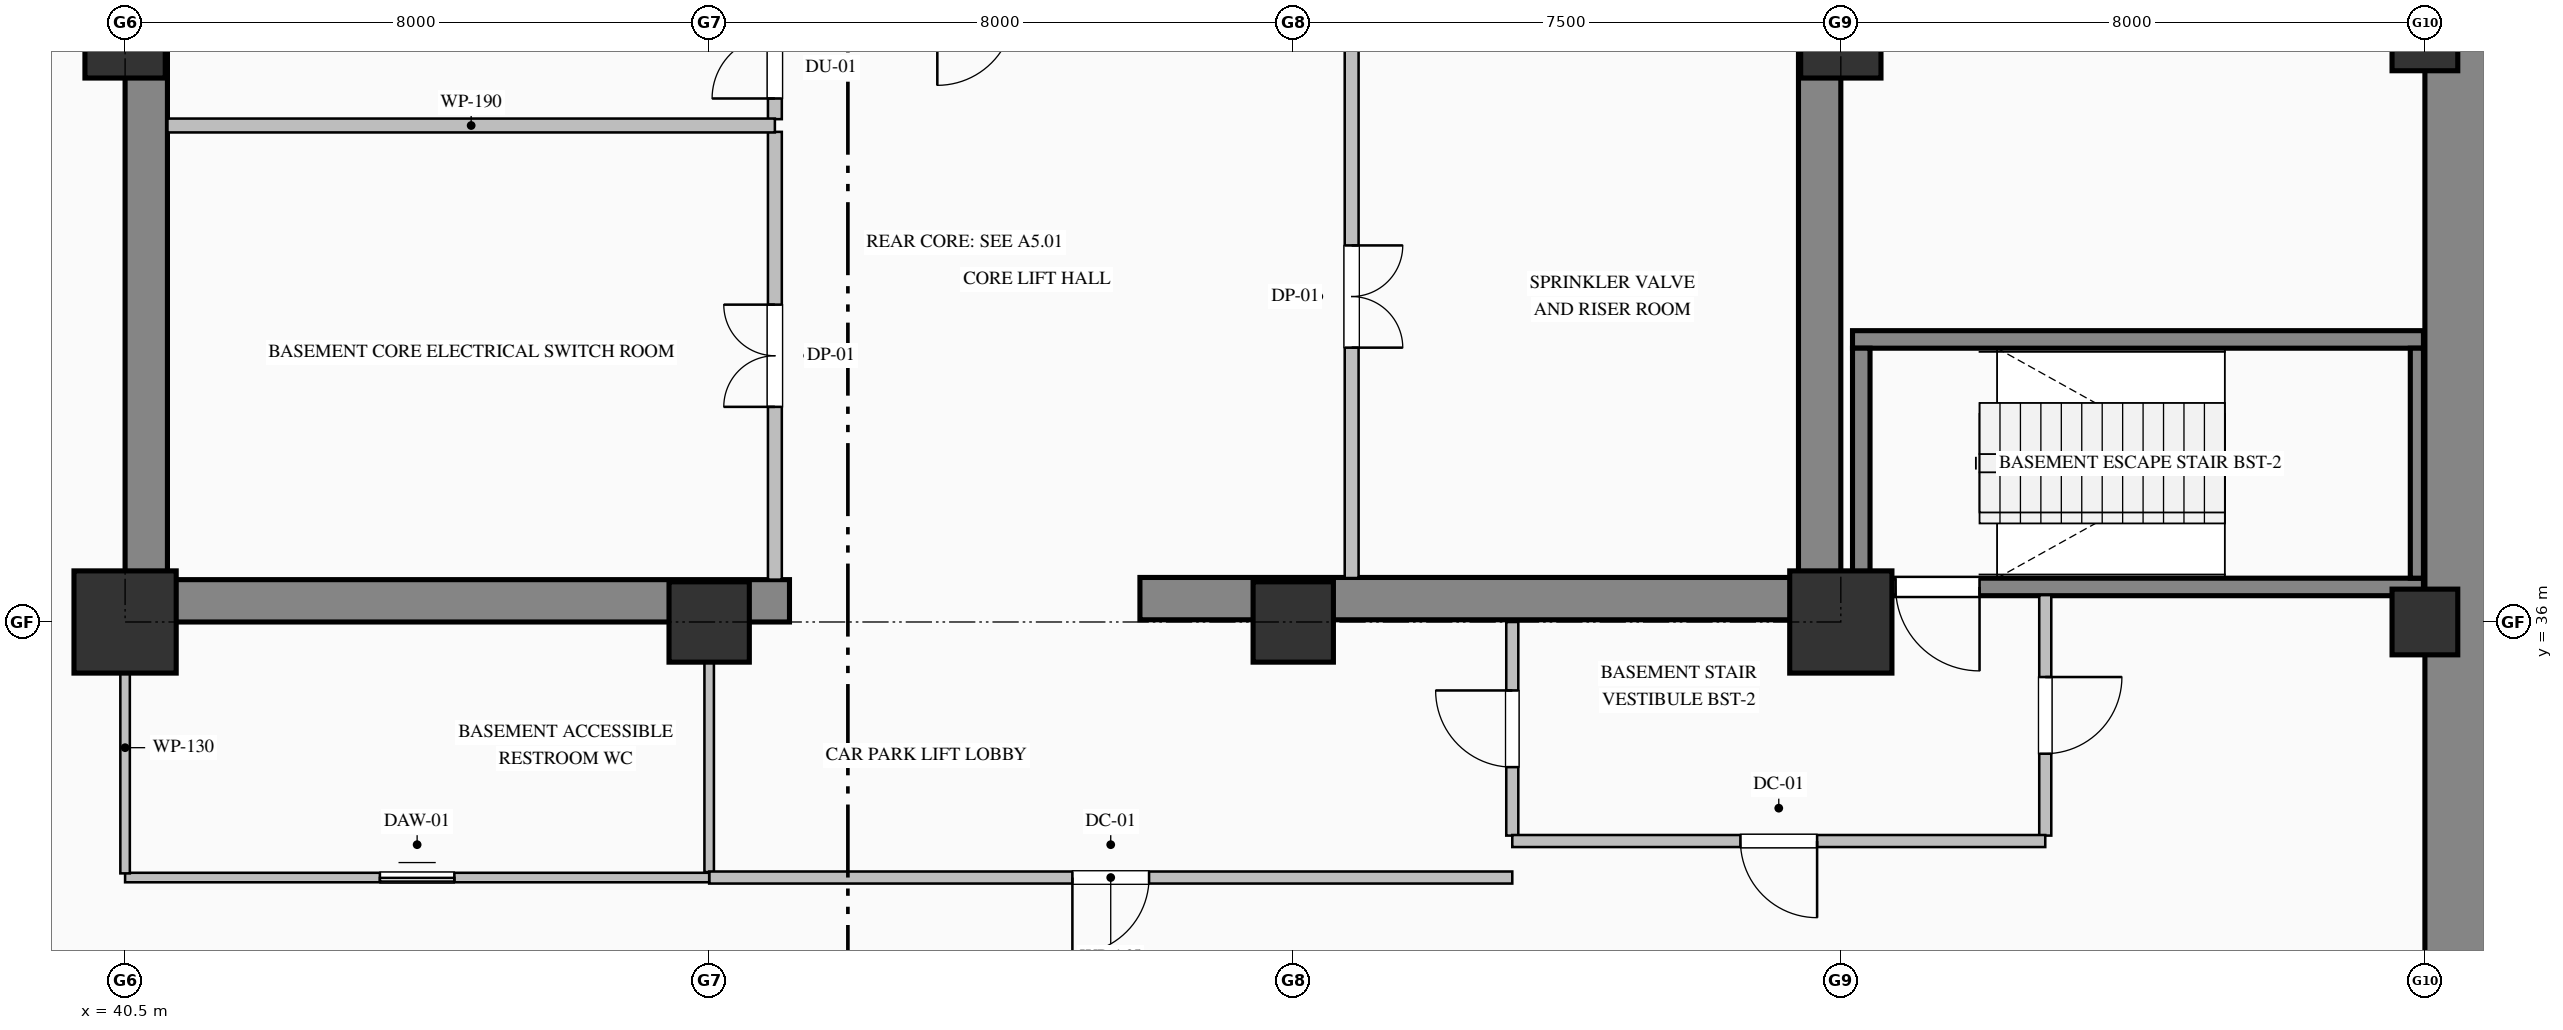
"""IFC4 building model, lengths in metres.
Left out: names, types, materials, properties, quantities, classifications, styles, units other than length and angle.
Written with IfcOpenShell. Run it as: python <this file> out.ifc"""

import sys

from ifc_helpers import new_model, si_unit, direction, frame, frame_2d, origin, origin_2d, place, context, subcontext, project, spatial, rectangle, hollow_rectangle, extrude, element, fill, save


model = new_model("IFC4")
c1 = context("Model", 3, precision=1e-05, world=origin(), true_north=direction((0.0, 1.0)))
c2 = subcontext(c1, "Body", "Model", "MODEL_VIEW")
j1 = project(units=[si_unit("LENGTHUNIT", "METRE"), si_unit("PLANEANGLEUNIT", "RADIAN")], contexts=[c1])
p1 = place(None, origin())
s1 = spatial("IfcSite", under=j1, at=p1, CompositionType="ELEMENT")
p2 = place(p1, origin())
s2 = spatial("IfcBuilding", under=s1, at=p2, CompositionType="ELEMENT")
p3 = place(p2, frame((0.0, 0.0, -9.2)))
s3 = spatial("IfcBuildingStorey", under=s2, at=p3, CompositionType="ELEMENT", Elevation=-9.2)
p4 = place(p3, frame((72.6, 0.0, 0.0), z_axis=(0.0, 0.0, 1.0), x_axis=(0.0, 1.0, 0.0)))
e1 = element("IfcWall", 1, at=p4, inside=s3, PredefinedType="USERDEFINED", context=c2, shape_type="SweptSolid", body=[
    extrude(rectangle(XDim=50.8, YDim=1.2, at=frame_2d((25.4, 0.0))), origin(), (0.0, 0.0, 1.0), 4.6),
])
p5 = place(p3, frame((63.71, 36.32, 0.0), z_axis=(0.0, 0.0, 1.0), x_axis=(0.0, 1.0, 0.0)))
e2 = element("IfcWall", 2, at=p5, inside=s3, PredefinedType="SHEAR", context=c2, shape_type="SweptSolid", body=[
    extrude(rectangle(XDim=15.1, YDim=0.58, at=frame_2d((7.55, 0.0))), origin(), (0.0, 0.0, 1.0), 4.24),
])
p6 = place(p3, frame((40.79, 36.58, 0.0), z_axis=(0.0, 0.0, 1.0), x_axis=(0.0, 1.0, 0.0)))
e3 = element("IfcWall", 3, at=p6, inside=s3, PredefinedType="SHEAR", context=c2, shape_type="SweptSolid", body=[
    extrude(rectangle(XDim=7.82, YDim=0.58, at=frame_2d((3.91, 0.0))), origin(), (0.0, 0.0, 1.0), 4.24),
])
p7 = place(p3, frame((40.5, 36.29, 0.0), z_axis=(0.0, 0.0, 1.0), x_axis=(1.0, 0.0, 0.0)))
e4 = element("IfcWall", 4, at=p7, inside=s3, PredefinedType="SHEAR", context=c2, shape_type="SweptSolid", body=[
    extrude(rectangle(XDim=9.1, YDim=0.58, at=frame_2d((4.55, 0.0))), origin(), (0.0, 0.0, 1.0), 4.24),
])
p8 = place(p3, frame((54.4, 36.32, 0.0), z_axis=(0.0, 0.0, 1.0), x_axis=(1.0, 0.0, 0.0)))
e5 = element("IfcWall", 5, at=p8, inside=s3, PredefinedType="SHEAR", context=c2, shape_type="SweptSolid", body=[
    extrude(rectangle(XDim=9.6, YDim=0.58, at=frame_2d((4.8, 0.0))), origin(), (0.0, 0.0, 1.0), 4.6),
])
p9 = place(p3, frame((40.5, 36.0, 0.0), z_axis=(0.0, 0.0, 1.0), x_axis=(1.0, 0.0, 0.0)))
e6 = element("IfcColumn", 6, at=p9, inside=s3, PredefinedType="COLUMN", context=c2, shape_type="SweptSolid", body=[
    extrude(hollow_rectangle(XDim=1.4, YDim=1.4, WallThickness=0.05, at=origin_2d()), origin(), (0.0, 0.0, 1.0), 4.6),
])
for number, where, z_axis, x_axis in (
    (7, (40.5, 44.0, 0.0), (0.0, 0.0, 1.0), (1.0, 0.0, 0.0)),
    (8, (48.5, 36.0, 0.0), (0.0, 0.0, 1.0), (1.0, 0.0, 0.0)),
    (9, (56.5, 36.0, 0.0), (0.0, 0.0, 1.0), (1.0, 0.0, 0.0)),
):
    element("IfcColumn", number, at=place(p3, frame(where, z_axis=z_axis, x_axis=x_axis)), inside=s3, PredefinedType="COLUMN", context=c2, shape_type="SweptSolid", body=[
        extrude(rectangle(XDim=1.1, YDim=1.1, at=origin_2d()), origin(), (0.0, 0.0, 1.0), 4.6),
    ])
p10 = place(p3, frame((64.0, 36.0, 0.0), z_axis=(0.0, 0.0, 1.0), x_axis=(1.0, 0.0, 0.0)))
e10 = element("IfcColumn", 10, at=p10, inside=s3, PredefinedType="COLUMN", context=c2, shape_type="SweptSolid", body=[
    extrude(hollow_rectangle(XDim=1.4, YDim=1.4, WallThickness=0.05, at=origin_2d()), origin(), (0.0, 0.0, 1.0), 4.6),
])
p11 = place(p3, frame((64.0, 44.0, 0.0), z_axis=(0.0, 0.0, 1.0), x_axis=(1.0, 0.0, 0.0)))
e11 = element("IfcColumn", 11, at=p11, inside=s3, PredefinedType="COLUMN", context=c2, shape_type="SweptSolid", body=[
    extrude(rectangle(XDim=1.1, YDim=1.1, at=origin_2d()), origin(), (0.0, 0.0, 1.0), 4.6),
])
for number, where, z_axis, x_axis in (
    (12, (72.0, 36.0, 0.0), (0.0, 0.0, 1.0), (1.0, 0.0, 0.0)),
    (13, (72.0, 44.0, 0.0), (0.0, 0.0, 1.0), (1.0, 0.0, 0.0)),
):
    element("IfcColumn", number, at=place(p3, frame(where, z_axis=z_axis, x_axis=x_axis)), inside=s3, PredefinedType="PILASTER", context=c2, shape_type="SweptSolid", body=[
        extrude(rectangle(XDim=0.9, YDim=0.9, at=origin_2d()), origin(), (0.0, 0.0, 1.0), 4.6),
    ])
p12 = place(p3, frame((64.16, 39.87, 0.0), z_axis=(0.0, 0.0, 1.0), x_axis=(1.0, 0.0, 0.0)))
e14 = element("IfcWall", 14, at=p12, inside=s3, PredefinedType="SOLIDWALL", context=c2, shape_type="SweptSolid", body=[
    extrude(rectangle(XDim=7.82, YDim=0.24, at=frame_2d((3.91, 0.0))), origin(), (0.0, 0.0, 1.0), 4.6),
])
p13 = place(p3, frame((71.98, 36.48, 0.0), z_axis=(0.0, 0.0, 1.0), x_axis=(-1.0, 0.0, 0.0)))
e15 = element("IfcWall", 15, at=p13, inside=s3, PredefinedType="SOLIDWALL", context=c2, shape_type="SweptSolid", body=[
    extrude(rectangle(XDim=7.82, YDim=0.24, at=frame_2d((3.91, 0.0))), origin(), (0.0, 0.0, 1.0), 4.6),
])
p14 = place(p13, frame((6.08, 0.0, 0.0)))
e16 = element("IfcOpeningElement", 16, at=p14, cuts=e15, PredefinedType="OPENING", context=c2, shape_type="SweptSolid", body=[
    extrude(rectangle(XDim=1.15, YDim=2.2, at=frame_2d((0.575, 1.1))), frame((0.0, 0.13, 0.0), z_axis=(0.0, -1.0, 0.0), x_axis=(1.0, 0.0, 0.0)), (0.0, 0.0, 1.0), 0.26),
])
p15 = place(p3, frame((64.28, 39.75, 0.0), z_axis=(0.0, 0.0, 1.0), x_axis=(0.0, -1.0, 0.0)))
e17 = element("IfcWall", 17, at=p15, inside=s3, PredefinedType="SOLIDWALL", context=c2, shape_type="SweptSolid", body=[
    extrude(rectangle(XDim=3.15, YDim=0.24, at=frame_2d((1.575, 0.0))), origin(), (0.0, 0.0, 1.0), 4.6),
])
p16 = place(p3, frame((71.89, 36.6, 0.0), z_axis=(0.0, 0.0, 1.0), x_axis=(0.0, 1.0, 0.0)))
e18 = element("IfcWall", 18, at=p16, inside=s3, PredefinedType="SOLIDWALL", context=c2, shape_type="SweptSolid", body=[
    extrude(rectangle(XDim=3.15, YDim=0.18, at=frame_2d((1.575, 0.0))), origin(), (0.0, 0.0, 1.0), 4.6),
])
p17 = place(p3, frame((49.4, 36.58, 0.0), z_axis=(0.0, 0.0, 1.0), x_axis=(0.0, 1.0, 0.0)))
e19 = element("IfcWall", 19, at=p17, inside=s3, PredefinedType="PARTITIONING", context=c2, shape_type="SweptSolid", body=[
    extrude(rectangle(XDim=6.133, YDim=0.19, at=frame_2d((3.066, 0.0))), origin(), (0.0, 0.0, 1.0), 3.332),
])
p18 = place(p17, frame((2.366, 0.0, 0.0)))
e20 = element("IfcOpeningElement", 20, at=p18, cuts=e19, PredefinedType="OPENING", context=c2, shape_type="SweptSolid", body=[
    extrude(rectangle(XDim=1.4, YDim=2.25, at=frame_2d((0.7, 1.125))), frame((0.0, 0.105, 0.0), z_axis=(0.0, -1.0, 0.0), x_axis=(1.0, 0.0, 0.0)), (0.0, 0.0, 1.0), 0.21),
])
p19 = place(p3, frame((49.4, 42.887, 0.0), z_axis=(0.0, 0.0, 1.0), x_axis=(0.0, 1.0, 0.0)))
e21 = element("IfcWall", 21, at=p19, inside=s3, PredefinedType="PARTITIONING", context=c2, shape_type="SweptSolid", body=[
    extrude(rectangle(XDim=1.426, YDim=0.19, at=frame_2d((0.713, 0.0))), origin(), (0.0, 0.0, 1.0), 3.332),
])
p20 = place(p19, frame((0.283, 0.0, 0.0)))
e22 = element("IfcOpeningElement", 22, at=p20, cuts=e21, PredefinedType="OPENING", context=c2, shape_type="SweptSolid", body=[
    extrude(rectangle(XDim=0.86, YDim=2.1, at=frame_2d((0.43, 1.05))), frame((0.0, 0.105, 0.0), z_axis=(0.0, -1.0, 0.0), x_axis=(1.0, 0.0, 0.0)), (0.0, 0.0, 1.0), 0.21),
])
p21 = place(p3, frame((57.3, 44.313, 0.0), z_axis=(0.0, 0.0, 1.0), x_axis=(0.0, -1.0, 0.0)))
e23 = element("IfcWall", 23, at=p21, inside=s3, PredefinedType="PARTITIONING", context=c2, shape_type="SweptSolid", body=[
    extrude(rectangle(XDim=7.711, YDim=0.19, at=frame_2d((3.855, 0.0))), origin(), (0.0, 0.0, 1.0), 4.24),
])
p22 = place(p21, frame((3.156, 0.0, 0.0)))
e24 = element("IfcOpeningElement", 24, at=p22, cuts=e23, PredefinedType="OPENING", context=c2, shape_type="SweptSolid", body=[
    extrude(rectangle(XDim=1.4, YDim=2.25, at=frame_2d((0.7, 1.125))), frame((0.0, 0.105, 0.0), z_axis=(0.0, -1.0, 0.0), x_axis=(1.0, 0.0, 0.0)), (0.0, 0.0, 1.0), 0.21),
])
p23 = place(p3, frame((41.08, 42.8, 0.0), z_axis=(0.0, 0.0, 1.0), x_axis=(1.0, 0.0, 0.0)))
e25 = element("IfcWall", 25, at=p23, inside=s3, PredefinedType="PARTITIONING", context=c2, shape_type="SweptSolid", body=[
    extrude(rectangle(XDim=8.32, YDim=0.19, at=frame_2d((4.16, 0.0))), origin(), (0.0, 0.0, 1.0), 4.24),
])
p24 = place(p3, frame((59.5, 33.074, 0.0), z_axis=(0.0, 0.0, 1.0), x_axis=(0.0, 1.0, 0.0)))
e26 = element("IfcWall", 26, at=p24, inside=s3, PredefinedType="PARTITIONING", context=c2, shape_type="SweptSolid", body=[
    extrude(rectangle(XDim=2.926, YDim=0.165, at=frame_2d((1.463, 0.0))), origin(), (0.0, 0.0, 1.0), 4.24),
])
p25 = place(p24, frame((0.938, 0.0, 0.0)))
e27 = element("IfcOpeningElement", 27, at=p25, cuts=e26, PredefinedType="OPENING", context=c2, shape_type="SweptSolid", body=[
    extrude(rectangle(XDim=1.05, YDim=2.15, at=frame_2d((0.525, 1.075))), frame((0.0, 0.093, 0.0), z_axis=(0.0, -1.0, 0.0), x_axis=(1.0, 0.0, 0.0)), (0.0, 0.0, 1.0), 0.185),
])
p26 = place(p3, frame((66.8, 36.368, 0.0), z_axis=(0.0, 0.0, 1.0), x_axis=(0.0, -1.0, 0.0)))
e28 = element("IfcWall", 28, at=p26, inside=s3, PredefinedType="PARTITIONING", context=c2, shape_type="SweptSolid", body=[
    extrude(rectangle(XDim=3.293, YDim=0.165, at=frame_2d((1.647, 0.0))), origin(), (0.0, 0.0, 1.0), 4.24),
])
p27 = place(p26, frame((1.122, 0.0, 0.0)))
e29 = element("IfcOpeningElement", 29, at=p27, cuts=e28, PredefinedType="OPENING", context=c2, shape_type="SweptSolid", body=[
    extrude(rectangle(XDim=1.05, YDim=2.15, at=frame_2d((0.525, 1.075))), frame((0.0, 0.093, 0.0), z_axis=(0.0, -1.0, 0.0), x_axis=(1.0, 0.0, 0.0)), (0.0, 0.0, 1.0), 0.185),
])
p28 = place(p3, frame((66.8, 33.0, 0.0), z_axis=(0.0, 0.0, 1.0), x_axis=(-1.0, 0.0, 0.0)))
e30 = element("IfcWall", 30, at=p28, inside=s3, PredefinedType="PARTITIONING", context=c2, shape_type="SweptSolid", body=[
    extrude(rectangle(XDim=7.3, YDim=0.165, at=frame_2d((3.65, 0.0))), origin(), (0.0, 0.0, 1.0), 4.24),
])
p29 = place(p28, frame((3.125, 0.0, 0.0)))
e31 = element("IfcOpeningElement", 31, at=p29, cuts=e30, PredefinedType="OPENING", context=c2, shape_type="SweptSolid", body=[
    extrude(rectangle(XDim=1.05, YDim=2.15, at=frame_2d((0.525, 1.075))), frame((0.0, 0.093, 0.0), z_axis=(0.0, -1.0, 0.0), x_axis=(1.0, 0.0, 0.0)), (0.0, 0.0, 1.0), 0.185),
])
p30 = place(p3, frame((48.5, 32.574, 0.0), z_axis=(0.0, 0.0, 1.0), x_axis=(0.0, 1.0, 0.0)))
e32 = element("IfcWall", 32, at=p30, inside=s3, PredefinedType="PARTITIONING", context=c2, shape_type="SweptSolid", body=[
    extrude(rectangle(XDim=3.426, YDim=0.13, at=frame_2d((1.713, 0.0))), origin(), (0.0, 0.0, 1.0), 3.332),
])
p31 = place(p3, frame((59.5, 32.5, 0.0), z_axis=(0.0, 0.0, 1.0), x_axis=(-1.0, 0.0, 0.0)))
e33 = element("IfcWall", 33, at=p31, inside=s3, PredefinedType="PARTITIONING", context=c2, shape_type="SweptSolid", body=[
    extrude(rectangle(XDim=11.0, YDim=0.165, at=frame_2d((5.5, 0.0))), origin(), (0.0, 0.0, 1.0), 4.24),
])
p32 = place(p31, frame((4.975, 0.0, 0.0)))
e34 = element("IfcOpeningElement", 34, at=p32, cuts=e33, PredefinedType="OPENING", context=c2, shape_type="SweptSolid", body=[
    extrude(rectangle(XDim=1.05, YDim=2.15, at=frame_2d((0.525, 1.075))), frame((0.0, 0.093, 0.0), z_axis=(0.0, -1.0, 0.0), x_axis=(1.0, 0.0, 0.0)), (0.0, 0.0, 1.0), 0.185),
])
p33 = place(p3, frame((48.5, 32.5, 0.0), z_axis=(0.0, 0.0, 1.0), x_axis=(-1.0, 0.0, 0.0)))
e35 = element("IfcWall", 35, at=p33, inside=s3, PredefinedType="PARTITIONING", context=c2, shape_type="SweptSolid", body=[
    extrude(rectangle(XDim=8.0, YDim=0.13, at=frame_2d((4.0, 0.0))), origin(), (0.0, 0.0, 1.0), 4.24),
])
p34 = place(p33, frame((3.49, 0.0, 0.0)))
e36 = element("IfcOpeningElement", 36, at=p34, cuts=e35, PredefinedType="OPENING", context=c2, shape_type="SweptSolid", body=[
    extrude(rectangle(XDim=1.02, YDim=2.15, at=frame_2d((0.51, 1.075))), frame((0.0, 0.075, 0.0), z_axis=(0.0, -1.0, 0.0), x_axis=(1.0, 0.0, 0.0)), (0.0, 0.0, 1.0), 0.15),
])
p35 = place(p3, frame((40.5, 32.557, 0.0), z_axis=(0.0, 0.0, 1.0), x_axis=(0.0, 1.0, 0.0)))
e37 = element("IfcWall", 37, at=p35, inside=s3, PredefinedType="PARTITIONING", context=c2, shape_type="SweptSolid", body=[
    extrude(rectangle(XDim=3.443, YDim=0.13, at=frame_2d((1.722, 0.0))), origin(), (0.0, 0.0, 1.0), 3.332),
])
p36 = place(p14, origin())
e38 = element("IfcDoor", 38, at=p36, inside=s3, OperationType="SINGLE_SWING_LEFT", PredefinedType="DOOR", context=c2, shape_type="SweptSolid", body=[
    extrude(rectangle(XDim=1.15, YDim=2.2, at=frame_2d((0.575, 1.1))), frame((0.0, 0.025, 0.0), z_axis=(0.0, -1.0, 0.0), x_axis=(1.0, 0.0, 0.0)), (0.0, 0.0, 1.0), 0.05),
])
fill(e16, e38)
p37 = place(p32, origin())
e39 = element("IfcDoor", 39, at=p37, inside=s3, OperationType="SINGLE_SWING_RIGHT", PredefinedType="DOOR", context=c2, shape_type="SweptSolid", body=[
    extrude(rectangle(XDim=1.05, YDim=2.15, at=frame_2d((0.525, 1.075))), frame((0.0, 0.025, 0.0), z_axis=(0.0, -1.0, 0.0), x_axis=(1.0, 0.0, 0.0)), (0.0, 0.0, 1.0), 0.05),
])
fill(e34, e39)
p38 = place(p29, origin())
e40 = element("IfcDoor", 40, at=p38, inside=s3, OperationType="SINGLE_SWING_LEFT", PredefinedType="DOOR", context=c2, shape_type="SweptSolid", body=[
    extrude(rectangle(XDim=1.05, YDim=2.15, at=frame_2d((0.525, 1.075))), frame((0.0, 0.025, 0.0), z_axis=(0.0, -1.0, 0.0), x_axis=(1.0, 0.0, 0.0)), (0.0, 0.0, 1.0), 0.05),
])
fill(e31, e40)
p39 = place(p27, origin())
e41 = element("IfcDoor", 41, at=p39, inside=s3, OperationType="SINGLE_SWING_LEFT", PredefinedType="DOOR", context=c2, shape_type="SweptSolid", body=[
    extrude(rectangle(XDim=1.05, YDim=2.15, at=frame_2d((0.525, 1.075))), frame((0.0, 0.025, 0.0), z_axis=(0.0, -1.0, 0.0), x_axis=(1.0, 0.0, 0.0)), (0.0, 0.0, 1.0), 0.05),
])
fill(e29, e41)
p40 = place(p25, origin())
e42 = element("IfcDoor", 42, at=p40, inside=s3, OperationType="SINGLE_SWING_RIGHT", PredefinedType="DOOR", context=c2, shape_type="SweptSolid", body=[
    extrude(rectangle(XDim=1.05, YDim=2.15, at=frame_2d((0.525, 1.075))), frame((0.0, 0.025, 0.0), z_axis=(0.0, -1.0, 0.0), x_axis=(1.0, 0.0, 0.0)), (0.0, 0.0, 1.0), 0.05),
])
fill(e27, e42)
p41 = place(p18, origin())
e43 = element("IfcDoor", 43, at=p41, inside=s3, OperationType="DOUBLE_DOOR_SINGLE_SWING", PredefinedType="DOOR", context=c2, shape_type="SweptSolid", body=[
    extrude(rectangle(XDim=1.4, YDim=2.25, at=frame_2d((0.7, 1.125))), frame((0.0, 0.025, 0.0), z_axis=(0.0, -1.0, 0.0), x_axis=(1.0, 0.0, 0.0)), (0.0, 0.0, 1.0), 0.05),
])
fill(e20, e43)
p42 = place(p20, origin())
e44 = element("IfcDoor", 44, at=p42, inside=s3, OperationType="SINGLE_SWING_LEFT", PredefinedType="DOOR", context=c2, shape_type="SweptSolid", body=[
    extrude(rectangle(XDim=0.86, YDim=2.1, at=frame_2d((0.43, 1.05))), frame((0.0, 0.025, 0.0), z_axis=(0.0, -1.0, 0.0), x_axis=(1.0, 0.0, 0.0)), (0.0, 0.0, 1.0), 0.05),
])
fill(e22, e44)
p43 = place(p22, origin())
e45 = element("IfcDoor", 45, at=p43, inside=s3, OperationType="DOUBLE_DOOR_SINGLE_SWING", PredefinedType="DOOR", context=c2, shape_type="SweptSolid", body=[
    extrude(rectangle(XDim=1.4, YDim=2.25, at=frame_2d((0.7, 1.125))), frame((0.0, 0.025, 0.0), z_axis=(0.0, -1.0, 0.0), x_axis=(1.0, 0.0, 0.0)), (0.0, 0.0, 1.0), 0.05),
])
fill(e24, e45)
p44 = place(p34, origin())
e46 = element("IfcDoor", 46, at=p44, inside=s3, OperationType="SLIDING_TO_LEFT", PredefinedType="DOOR", context=c2, shape_type="SweptSolid", body=[
    extrude(rectangle(XDim=1.02, YDim=2.15, at=frame_2d((0.51, 1.075))), frame((0.0, 0.025, 0.0), z_axis=(0.0, -1.0, 0.0), x_axis=(1.0, 0.0, 0.0)), (0.0, 0.0, 1.0), 0.05),
])
fill(e36, e46)
save(model, sys.argv[1])
